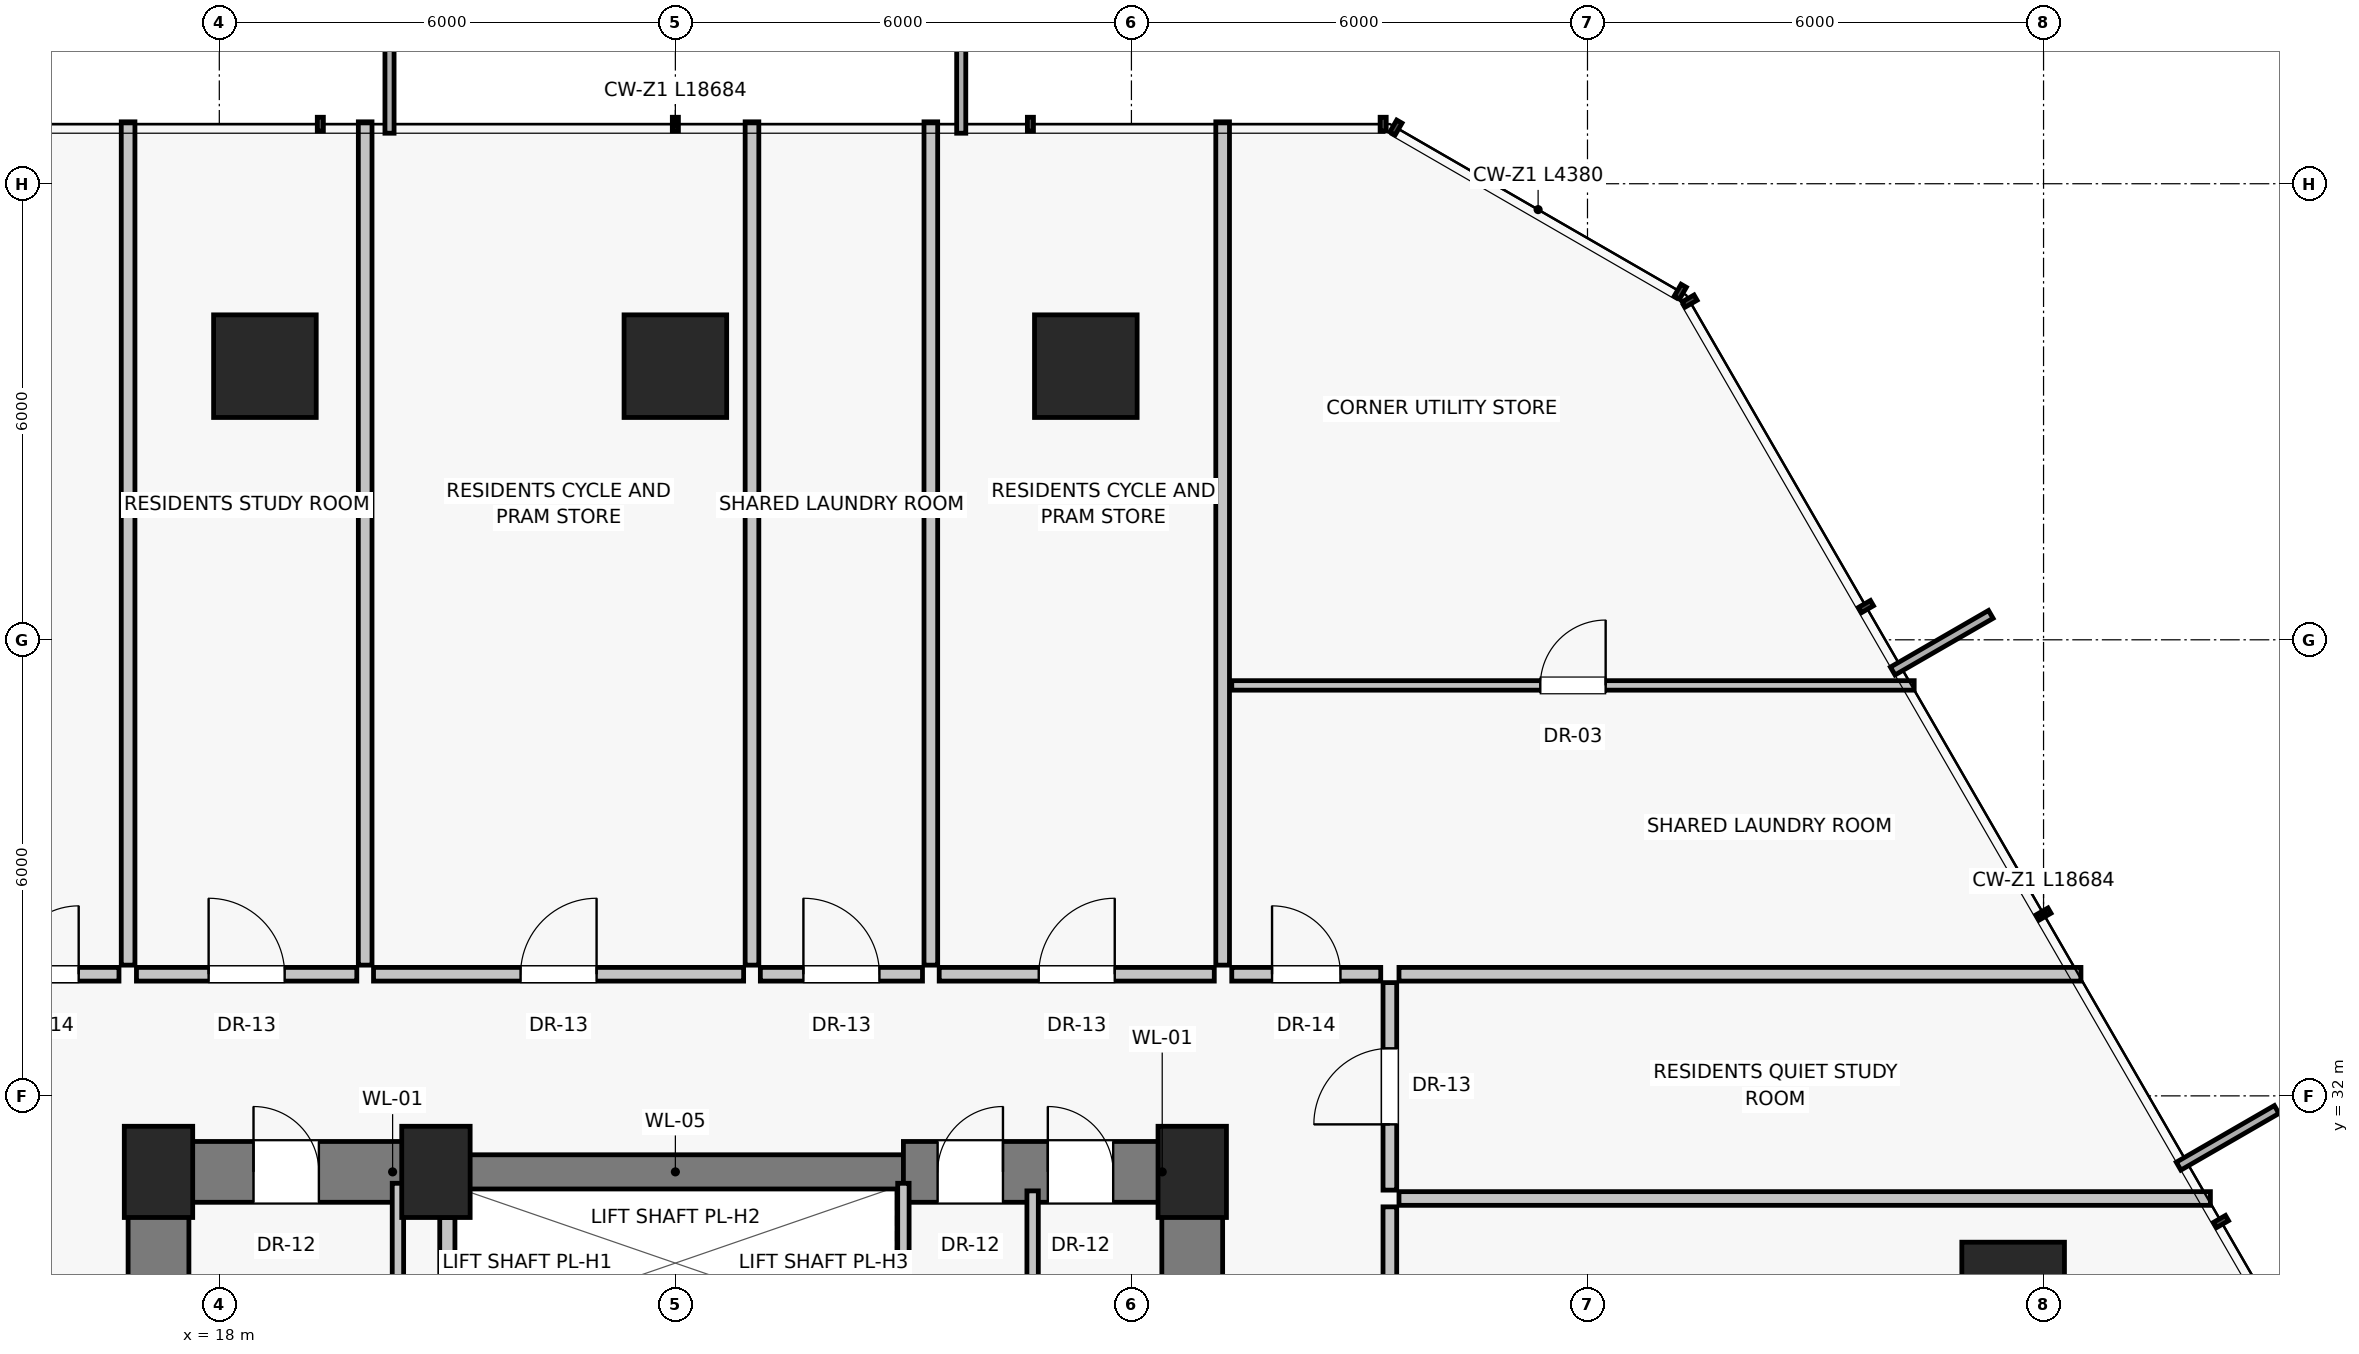
"""IFC4 building model, lengths in metres.
Left out: names, types, materials, properties, quantities, classifications, styles, units other than length and angle.
Written with IfcOpenShell. Run it as: python <this file> out.ifc"""

import sys

from ifc_helpers import new_model, si_unit, direction, frame, frame_2d, origin, origin_2d, place, context, subcontext, project, spatial, rectangle, extrude, source, transform, mapped, element, fill, save


model = new_model("IFC4")
c1 = context("Model", 3, precision=1e-05, world=origin(), true_north=direction((0.0, 1.0)))
c2 = subcontext(c1, "Body", "Model", "MODEL_VIEW")
j1 = project(units=[si_unit("LENGTHUNIT", "METRE"), si_unit("PLANEANGLEUNIT", "RADIAN")], contexts=[c1])
p1 = place(None, origin())
s1 = spatial("IfcSite", under=j1, at=p1, CompositionType="ELEMENT")
p2 = place(p1, origin())
s2 = spatial("IfcBuilding", under=s1, at=p2, CompositionType="ELEMENT")
p3 = place(p2, frame((0.0, 0.0, 22.8)))
s3 = spatial("IfcBuildingStorey", under=s2, at=p3, CompositionType="ELEMENT", Elevation=22.8)
for number, where, z_axis, x_axis in (
    (1, (17.2, 31.0, 0.0), (0.0, 0.0, 1.0), (1.0, 0.0, 0.0)),
    (2, (20.85, 31.0, 0.0), (0.0, 0.0, 1.0), (1.0, 0.0, 0.0)),
    (3, (30.8, 31.0, 0.0), (0.0, 0.0, 1.0), (1.0, 0.0, 0.0)),
):
    element("IfcColumn", number, at=place(p3, frame(where, z_axis=z_axis, x_axis=x_axis)), inside=s3, PredefinedType="PILASTER", context=c2, shape_type="SweptSolid", body=[
        extrude(rectangle(XDim=0.9, YDim=1.2, at=origin_2d()), origin(), (0.0, 0.0, 1.0), 4.5),
    ])
for number, where, z_axis, x_axis in (
    (4, (41.6, 29.4, 0.0), (0.0, 0.0, 1.0), (1.0, 0.0, 0.0)),
    (5, (29.4, 41.6, 0.0), (0.0, 0.0, 1.0), (1.0, 0.0, 0.0)),
):
    element("IfcColumn", number, at=place(p3, frame(where, z_axis=z_axis, x_axis=x_axis)), inside=s3, PredefinedType="COLUMN", context=c2, shape_type="SweptSolid", body=[
        extrude(rectangle(XDim=1.35, YDim=1.35, at=origin_2d()), origin(), (0.0, 0.0, 1.0), 4.5),
    ])
p4 = place(p3, frame((24.0, 41.6, -0.35), z_axis=(0.0, 0.0, 1.0), x_axis=(1.0, 0.0, 0.0)))
e6 = element("IfcColumn", 6, at=p4, inside=s3, PredefinedType="COLUMN", context=c2, shape_type="SweptSolid", body=[
    extrude(rectangle(XDim=1.35, YDim=1.35, at=origin_2d()), origin(), (0.0, 0.0, 1.0), 4.85),
])
p5 = place(p3, frame((18.6, 41.6, 0.0), z_axis=(0.0, 0.0, 1.0), x_axis=(1.0, 0.0, 0.0)))
e7 = element("IfcColumn", 7, at=p5, inside=s3, PredefinedType="COLUMN", context=c2, shape_type="SweptSolid", body=[
    extrude(rectangle(XDim=1.35, YDim=1.35, at=origin_2d()), origin(), (0.0, 0.0, 1.0), 4.5),
])
for number, where, z_axis, x_axis in (
    (8, (17.2, 16.8, 0.0), (0.0, 0.0, 1.0), (0.0, 1.0, 0.0)),
    (9, (30.8, 16.8, 0.0), (0.0, 0.0, 1.0), (0.0, 1.0, 0.0)),
):
    element("IfcWall", number, at=place(p3, frame(where, z_axis=z_axis, x_axis=x_axis)), inside=s3, PredefinedType="SHEAR", context=c2, shape_type="SweptSolid", body=[
        extrude(rectangle(XDim=14.2, YDim=0.8, at=frame_2d((7.1, 0.0))), origin(), (0.0, 0.0, 1.0), 4.25),
    ])
p6 = place(p3, frame((17.2, 31.0, 0.0), z_axis=(0.0, 0.0, 1.0), x_axis=(1.0, 0.0, 0.0)))
e10 = element("IfcWall", 10, at=p6, inside=s3, PredefinedType="SHEAR", context=c2, shape_type="SweptSolid", body=[
    extrude(rectangle(XDim=3.8, YDim=0.8, at=frame_2d((1.9, 0.0))), origin(), (0.0, 0.0, 1.0), 4.25),
])
p7 = place(p6, frame((1.25, 0.0, 0.0)))
e11 = element("IfcOpeningElement", 11, at=p7, cuts=e10, PredefinedType="OPENING", context=c2, shape_type="SweptSolid", body=[
    extrude(rectangle(XDim=0.86, YDim=2.01, at=frame_2d((0.43, 1.005))), frame((0.0, 0.41, 0.0), z_axis=(0.0, -1.0, 0.0), x_axis=(1.0, 0.0, 0.0)), (0.0, 0.0, 1.0), 0.82),
])
p8 = place(p3, frame((21.0, 31.0, 0.0), z_axis=(0.0, 0.0, 1.0), x_axis=(1.0, 0.0, 0.0)))
e12 = element("IfcWall", 12, at=p8, inside=s3, PredefinedType="SHEAR", context=c2, shape_type="SweptSolid", body=[
    extrude(rectangle(XDim=6.0, YDim=0.45, at=frame_2d((3.0, 0.0))), origin(), (0.0, 0.0, 1.0), 4.25),
])
p9 = place(p3, frame((27.0, 31.0, 0.0), z_axis=(0.0, 0.0, 1.0), x_axis=(1.0, 0.0, 0.0)))
e13 = element("IfcWall", 13, at=p9, inside=s3, PredefinedType="SHEAR", context=c2, shape_type="SweptSolid", body=[
    extrude(rectangle(XDim=3.8, YDim=0.8, at=frame_2d((1.9, 0.0))), origin(), (0.0, 0.0, 1.0), 4.25),
])
p10 = place(p9, frame((0.45, 0.0, 0.0)))
e14 = element("IfcOpeningElement", 14, at=p10, cuts=e13, PredefinedType="OPENING", context=c2, shape_type="SweptSolid", body=[
    extrude(rectangle(XDim=0.86, YDim=2.01, at=frame_2d((0.43, 1.005))), frame((0.0, 0.41, 0.0), z_axis=(0.0, -1.0, 0.0), x_axis=(1.0, 0.0, 0.0)), (0.0, 0.0, 1.0), 0.82),
])
p11 = place(p9, frame((1.9, 0.0, 0.0)))
e15 = element("IfcOpeningElement", 15, at=p11, cuts=e13, PredefinedType="OPENING", context=c2, shape_type="SweptSolid", body=[
    extrude(rectangle(XDim=0.86, YDim=2.01, at=frame_2d((0.43, 1.005))), frame((0.0, 0.41, 0.0), z_axis=(0.0, -1.0, 0.0), x_axis=(1.0, 0.0, 0.0)), (0.0, 0.0, 1.0), 0.82),
])
for number, where, z_axis, x_axis in (
    (16, (20.35, 28.65, 0.0), (0.0, 0.0, 1.0), (0.0, 1.0, 0.0)),
    (17, (27.0, 28.65, 0.0), (0.0, 0.0, 1.0), (0.0, 1.0, 0.0)),
):
    element("IfcWall", number, at=place(p3, frame(where, z_axis=z_axis, x_axis=x_axis)), inside=s3, PredefinedType="PARTITIONING", context=c2, shape_type="SweptSolid", body=[
        extrude(rectangle(XDim=2.2, YDim=0.15, at=frame_2d((1.1, 0.0))), origin(), (0.0, 0.0, 1.0), 4.25),
    ])
p12 = place(p3, frame((21.0, 28.8, 0.0), z_axis=(0.0, 0.0, 1.0), x_axis=(0.0, 1.0, 0.0)))
e18 = element("IfcWall", 18, at=p12, inside=s3, PredefinedType="SOLIDWALL", context=c2, shape_type="SweptSolid", body=[
    extrude(rectangle(XDim=1.6, YDim=0.2, at=frame_2d((0.8, 0.0))), origin(), (0.0, 0.0, 1.0), 4.25),
])
p13 = place(p3, frame((28.7, 28.75, 0.0), z_axis=(0.0, 0.0, 1.0), x_axis=(0.0, 1.0, 0.0)))
e19 = element("IfcWall", 19, at=p13, inside=s3, PredefinedType="PARTITIONING", context=c2, shape_type="SweptSolid", body=[
    extrude(rectangle(XDim=2.0, YDim=0.15, at=frame_2d((1.0, 0.0))), origin(), (0.0, 0.0, 1.0), 4.25),
])
for number, where, z_axis, x_axis in (
    (20, (16.8, 33.72, 0.0), (0.0, 0.0, 1.0), (0.0, 1.0, 0.0)),
    (21, (31.2, 33.72, 0.0), (0.0, 0.0, 1.0), (0.0, 1.0, 0.0)),
):
    element("IfcWall", number, at=place(p3, frame(where, z_axis=z_axis, x_axis=x_axis)), inside=s3, PredefinedType="PARTITIONING", context=c2, shape_type="SweptSolid", body=[
        extrude(rectangle(XDim=11.095, YDim=0.18, at=frame_2d((5.547, 0.0))), origin(), (0.0, 0.0, 1.0), 4.25),
    ])
p14 = place(p3, frame((16.91, 33.6, 0.0), z_axis=(0.0, 0.0, 1.0), x_axis=(1.0, 0.0, 0.0)))
e22 = element("IfcWall", 22, at=p14, inside=s3, PredefinedType="PARTITIONING", context=c2, shape_type="SweptSolid", body=[
    extrude(rectangle(XDim=2.899, YDim=0.18, at=frame_2d((1.45, 0.0))), origin(), (0.0, 0.0, 1.0), 4.25),
])
p15 = place(p14, frame((0.949, 0.0, 0.0)))
e23 = element("IfcOpeningElement", 23, at=p15, cuts=e22, PredefinedType="OPENING", context=c2, shape_type="SweptSolid", body=[
    extrude(rectangle(XDim=1.0, YDim=2.01, at=frame_2d((0.5, 1.005))), frame((0.0, 0.1, 0.0), z_axis=(0.0, -1.0, 0.0), x_axis=(1.0, 0.0, 0.0)), (0.0, 0.0, 1.0), 0.2),
])
p16 = place(p3, frame((20.029, 33.6, 0.0), z_axis=(0.0, 0.0, 1.0), x_axis=(1.0, 0.0, 0.0)))
e24 = element("IfcWall", 24, at=p16, inside=s3, PredefinedType="PARTITIONING", context=c2, shape_type="SweptSolid", body=[
    extrude(rectangle(XDim=4.869, YDim=0.18, at=frame_2d((2.435, 0.0))), origin(), (0.0, 0.0, 1.0), 4.25),
])
p17 = place(p16, frame((1.935, 0.0, 0.0)))
e25 = element("IfcOpeningElement", 25, at=p17, cuts=e24, PredefinedType="OPENING", context=c2, shape_type="SweptSolid", body=[
    extrude(rectangle(XDim=1.0, YDim=2.01, at=frame_2d((0.5, 1.005))), frame((0.0, 0.1, 0.0), z_axis=(0.0, -1.0, 0.0), x_axis=(1.0, 0.0, 0.0)), (0.0, 0.0, 1.0), 0.2),
])
for number, where, z_axis, x_axis in (
    (26, (19.919, 33.72, 0.0), (0.0, 0.0, 1.0), (0.0, 1.0, 0.0)),
    (27, (25.008, 33.72, 0.0), (0.0, 0.0, 1.0), (0.0, 1.0, 0.0)),
):
    element("IfcWall", number, at=place(p3, frame(where, z_axis=z_axis, x_axis=x_axis)), inside=s3, PredefinedType="PARTITIONING", context=c2, shape_type="SweptSolid", body=[
        extrude(rectangle(XDim=11.095, YDim=0.18, at=frame_2d((5.547, 0.0))), origin(), (0.0, 0.0, 1.0), 4.25),
    ])
p18 = place(p3, frame((25.118, 33.6, 0.0), z_axis=(0.0, 0.0, 1.0), x_axis=(1.0, 0.0, 0.0)))
e28 = element("IfcWall", 28, at=p18, inside=s3, PredefinedType="PARTITIONING", context=c2, shape_type="SweptSolid", body=[
    extrude(rectangle(XDim=2.133, YDim=0.18, at=frame_2d((1.066, 0.0))), origin(), (0.0, 0.0, 1.0), 4.25),
])
p19 = place(p18, frame((0.566, 0.0, 0.0)))
e29 = element("IfcOpeningElement", 29, at=p19, cuts=e28, PredefinedType="OPENING", context=c2, shape_type="SweptSolid", body=[
    extrude(rectangle(XDim=1.0, YDim=2.01, at=frame_2d((0.5, 1.005))), frame((0.0, 0.1, 0.0), z_axis=(0.0, -1.0, 0.0), x_axis=(1.0, 0.0, 0.0)), (0.0, 0.0, 1.0), 0.2),
])
p20 = place(p3, frame((27.471, 33.6, 0.0), z_axis=(0.0, 0.0, 1.0), x_axis=(1.0, 0.0, 0.0)))
e30 = element("IfcWall", 30, at=p20, inside=s3, PredefinedType="PARTITIONING", context=c2, shape_type="SweptSolid", body=[
    extrude(rectangle(XDim=3.619, YDim=0.18, at=frame_2d((1.81, 0.0))), origin(), (0.0, 0.0, 1.0), 4.25),
])
p21 = place(p20, frame((1.31, 0.0, 0.0)))
e31 = element("IfcOpeningElement", 31, at=p21, cuts=e30, PredefinedType="OPENING", context=c2, shape_type="SweptSolid", body=[
    extrude(rectangle(XDim=1.0, YDim=2.01, at=frame_2d((0.5, 1.005))), frame((0.0, 0.1, 0.0), z_axis=(0.0, -1.0, 0.0), x_axis=(1.0, 0.0, 0.0)), (0.0, 0.0, 1.0), 0.2),
])
p22 = place(p3, frame((27.361, 33.72, 0.0), z_axis=(0.0, 0.0, 1.0), x_axis=(0.0, 1.0, 0.0)))
e32 = element("IfcWall", 32, at=p22, inside=s3, PredefinedType="PARTITIONING", context=c2, shape_type="SweptSolid", body=[
    extrude(rectangle(XDim=11.095, YDim=0.18, at=frame_2d((5.547, 0.0))), origin(), (0.0, 0.0, 1.0), 4.25),
])
p23 = place(p3, frame((33.52, 33.6, 0.0), z_axis=(0.0, 0.0, 1.0), x_axis=(1.0, 0.0, 0.0)))
e33 = element("IfcWall", 33, at=p23, inside=s3, PredefinedType="PARTITIONING", context=c2, shape_type="SweptSolid", body=[
    extrude(rectangle(XDim=8.972, YDim=0.18, at=frame_2d((4.486, 0.0))), origin(), (0.0, 0.0, 1.0), 4.25),
])
p24 = place(p3, frame((33.4, 30.76, 0.0), z_axis=(0.0, 0.0, 1.0), x_axis=(0.0, 1.0, 0.0)))
e34 = element("IfcWall", 34, at=p24, inside=s3, PredefinedType="PARTITIONING", context=c2, shape_type="SweptSolid", body=[
    extrude(rectangle(XDim=2.73, YDim=0.18, at=frame_2d((1.365, 0.0))), origin(), (0.0, 0.0, 1.0), 4.25),
])
p25 = place(p24, frame((0.865, 0.0, 0.0)))
e35 = element("IfcOpeningElement", 35, at=p25, cuts=e34, PredefinedType="OPENING", context=c2, shape_type="SweptSolid", body=[
    extrude(rectangle(XDim=1.0, YDim=2.01, at=frame_2d((0.5, 1.005))), frame((0.0, 0.1, 0.0), z_axis=(0.0, -1.0, 0.0), x_axis=(1.0, 0.0, 0.0)), (0.0, 0.0, 1.0), 0.2),
])
p26 = place(p3, frame((33.52, 30.65, 0.0), z_axis=(0.0, 0.0, 1.0), x_axis=(1.0, 0.0, 0.0)))
e36 = element("IfcWall", 36, at=p26, inside=s3, PredefinedType="PARTITIONING", context=c2, shape_type="SweptSolid", body=[
    extrude(rectangle(XDim=10.675, YDim=0.18, at=frame_2d((5.338, 0.0))), origin(), (0.0, 0.0, 1.0), 3.549),
])
p27 = place(p3, frame((33.4, 25.368, 0.0), z_axis=(0.0, 0.0, 1.0), x_axis=(0.0, 1.0, 0.0)))
e37 = element("IfcWall", 37, at=p27, inside=s3, PredefinedType="PARTITIONING", context=c2, shape_type="SweptSolid", body=[
    extrude(rectangle(XDim=5.172, YDim=0.18, at=frame_2d((2.586, 0.0))), origin(), (0.0, 0.0, 1.0), 4.25),
])
p28 = place(p27, frame((3.028, 0.0, 0.0)))
e38 = element("IfcOpeningElement", 38, at=p28, cuts=e37, PredefinedType="OPENING", context=c2, shape_type="SweptSolid", body=[
    extrude(rectangle(XDim=0.95, YDim=2.02, at=frame_2d((0.475, 1.01))), frame((0.0, 0.1, 0.0), z_axis=(0.0, -1.0, 0.0), x_axis=(1.0, 0.0, 0.0)), (0.0, 0.0, 1.0), 0.2),
])
p29 = place(p3, frame((14.72, 33.6, 0.0), z_axis=(0.0, 0.0, 1.0), x_axis=(1.0, 0.0, 0.0)))
e39 = element("IfcWall", 39, at=p29, inside=s3, PredefinedType="PARTITIONING", context=c2, shape_type="SweptSolid", body=[
    extrude(rectangle(XDim=1.96, YDim=0.18, at=frame_2d((0.98, 0.0))), origin(), (0.0, 0.0, 1.0), 4.25),
])
p30 = place(p29, frame((0.53, 0.0, 0.0)))
e40 = element("IfcOpeningElement", 40, at=p30, cuts=e39, PredefinedType="OPENING", context=c2, shape_type="SweptSolid", body=[
    extrude(rectangle(XDim=0.9, YDim=2.01, at=frame_2d((0.45, 1.005))), frame((0.0, 0.1, 0.0), z_axis=(0.0, -1.0, 0.0), x_axis=(1.0, 0.0, 0.0)), (0.0, 0.0, 1.0), 0.2),
])
p31 = place(p3, frame((31.32, 33.6, 0.0), z_axis=(0.0, 0.0, 1.0), x_axis=(1.0, 0.0, 0.0)))
e41 = element("IfcWall", 41, at=p31, inside=s3, PredefinedType="PARTITIONING", context=c2, shape_type="SweptSolid", body=[
    extrude(rectangle(XDim=1.96, YDim=0.18, at=frame_2d((0.98, 0.0))), origin(), (0.0, 0.0, 1.0), 4.25),
])
p32 = place(p31, frame((0.53, 0.0, 0.0)))
e42 = element("IfcOpeningElement", 42, at=p32, cuts=e41, PredefinedType="OPENING", context=c2, shape_type="SweptSolid", body=[
    extrude(rectangle(XDim=0.9, YDim=2.01, at=frame_2d((0.45, 1.005))), frame((0.0, 0.1, 0.0), z_axis=(0.0, -1.0, 0.0), x_axis=(1.0, 0.0, 0.0)), (0.0, 0.0, 1.0), 0.2),
])
p33 = place(p3, frame((31.32, 37.4, 0.0), z_axis=(0.0, 0.0, 1.0), x_axis=(1.0, 0.0, 0.0)))
e43 = element("IfcWall", 43, at=p33, inside=s3, PredefinedType="PARTITIONING", context=c2, shape_type="SweptSolid", body=[
    extrude(rectangle(XDim=8.978, YDim=0.125, at=frame_2d((4.489, 0.0))), origin(), (0.0, 0.0, 1.0), 4.25),
])
p34 = place(p33, frame((4.059, 0.0, 0.0)))
e44 = element("IfcOpeningElement", 44, at=p34, cuts=e43, PredefinedType="OPENING", context=c2, shape_type="SweptSolid", body=[
    extrude(rectangle(XDim=0.86, YDim=2.01, at=frame_2d((0.43, 1.005))), frame((0.0, 0.073, 0.0), z_axis=(0.0, -1.0, 0.0), x_axis=(1.0, 0.0, 0.0)), (0.0, 0.0, 1.0), 0.145),
])
m1 = source(origin(), c2, "Body", "SweptSolid", [
    extrude(rectangle(XDim=0.86, YDim=2.01, at=frame_2d((0.43, 1.005))), frame((0.0, 0.025, 0.0), z_axis=(0.0, -1.0, 0.0), x_axis=(1.0, 0.0, 0.0)), (0.0, 0.0, 1.0), 0.05),
])
p35 = place(p7, origin())
e45 = element("IfcDoor", 45, at=p35, inside=s3, OperationType="SINGLE_SWING_LEFT", PredefinedType="DOOR", context=c2, shape_type="MappedRepresentation", body=[
    mapped(m1, transform((0.0, 0.0, 0.0), scale=1.0)),
])
fill(e11, e45)
p36 = place(p10, origin())
e46 = element("IfcDoor", 46, at=p36, inside=s3, OperationType="SINGLE_SWING_RIGHT", PredefinedType="DOOR", context=c2, shape_type="MappedRepresentation", body=[
    mapped(m1, transform((0.0, 0.0, 0.0), scale=1.0)),
])
fill(e14, e46)
p37 = place(p11, origin())
e47 = element("IfcDoor", 47, at=p37, inside=s3, OperationType="SINGLE_SWING_LEFT", PredefinedType="DOOR", context=c2, shape_type="MappedRepresentation", body=[
    mapped(m1, transform((0.0, 0.0, 0.0), scale=1.0)),
])
fill(e15, e47)
m2 = source(origin(), c2, "Body", "SweptSolid", [
    extrude(rectangle(XDim=1.0, YDim=2.01, at=frame_2d((0.5, 1.005))), frame((0.0, 0.025, 0.0), z_axis=(0.0, -1.0, 0.0), x_axis=(1.0, 0.0, 0.0)), (0.0, 0.0, 1.0), 0.05),
])
p38 = place(p15, origin())
e48 = element("IfcDoor", 48, at=p38, inside=s3, OperationType="SINGLE_SWING_LEFT", PredefinedType="DOOR", context=c2, shape_type="MappedRepresentation", body=[
    mapped(m2, transform((0.0, 0.0, 0.0), scale=1.0)),
])
fill(e23, e48)
p39 = place(p17, origin())
e49 = element("IfcDoor", 49, at=p39, inside=s3, OperationType="SINGLE_SWING_RIGHT", PredefinedType="DOOR", context=c2, shape_type="MappedRepresentation", body=[
    mapped(m2, transform((0.0, 0.0, 0.0), scale=1.0)),
])
fill(e25, e49)
p40 = place(p19, origin())
e50 = element("IfcDoor", 50, at=p40, inside=s3, OperationType="SINGLE_SWING_LEFT", PredefinedType="DOOR", context=c2, shape_type="MappedRepresentation", body=[
    mapped(m2, transform((0.0, 0.0, 0.0), scale=1.0)),
])
fill(e29, e50)
p41 = place(p21, origin())
e51 = element("IfcDoor", 51, at=p41, inside=s3, OperationType="SINGLE_SWING_RIGHT", PredefinedType="DOOR", context=c2, shape_type="MappedRepresentation", body=[
    mapped(m2, transform((0.0, 0.0, 0.0), scale=1.0)),
])
fill(e31, e51)
p42 = place(p25, origin())
e52 = element("IfcDoor", 52, at=p42, inside=s3, OperationType="SINGLE_SWING_LEFT", PredefinedType="DOOR", context=c2, shape_type="MappedRepresentation", body=[
    mapped(m2, transform((0.0, 0.0, 0.0), scale=1.0)),
])
fill(e35, e52)
m3 = source(origin(), c2, "Body", "SweptSolid", [
    extrude(rectangle(XDim=0.9, YDim=2.01, at=frame_2d((0.45, 1.005))), frame((0.0, 0.025, 0.0), z_axis=(0.0, -1.0, 0.0), x_axis=(1.0, 0.0, 0.0)), (0.0, 0.0, 1.0), 0.05),
])
p43 = place(p30, origin())
e53 = element("IfcDoor", 53, at=p43, inside=s3, OperationType="SINGLE_SWING_RIGHT", PredefinedType="DOOR", context=c2, shape_type="MappedRepresentation", body=[
    mapped(m3, transform((0.0, 0.0, 0.0), scale=1.0)),
])
fill(e40, e53)
p44 = place(p32, origin())
e54 = element("IfcDoor", 54, at=p44, inside=s3, OperationType="SINGLE_SWING_LEFT", PredefinedType="DOOR", context=c2, shape_type="MappedRepresentation", body=[
    mapped(m3, transform((0.0, 0.0, 0.0), scale=1.0)),
])
fill(e42, e54)
p45 = place(p34, origin())
e55 = element("IfcDoor", 55, at=p45, inside=s3, OperationType="SINGLE_SWING_RIGHT", PredefinedType="DOOR", context=c2, shape_type="MappedRepresentation", body=[
    mapped(m1, transform((0.0, 0.0, 0.0), scale=1.0)),
])
fill(e44, e55)
save(model, sys.argv[1])
